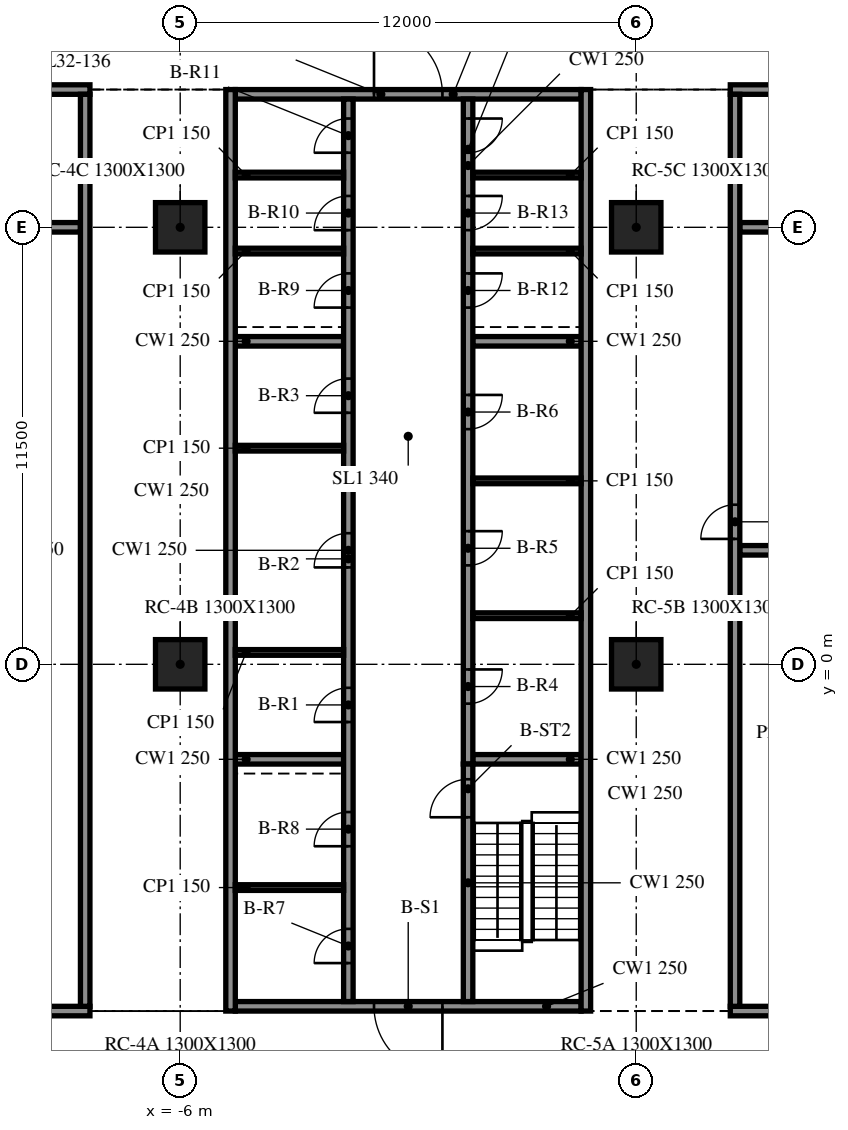
"""IFC4 building model, lengths in metres.
Left out: names, types, materials, properties, quantities, classifications, styles, units other than length and angle.
Written with IfcOpenShell. Run it as: python <this file> out.ifc"""

import sys

from ifc_helpers import new_model, si_unit, direction, frame, frame_2d, origin, origin_2d, place, context, subcontext, project, spatial, rectangle, extrude, element, fill, save


model = new_model("IFC4")
c1 = context("Model", 3, precision=1e-05, world=origin(), true_north=direction((0.0, 1.0)))
c2 = subcontext(c1, "Body", "Model", "MODEL_VIEW")
j1 = project(units=[si_unit("LENGTHUNIT", "METRE"), si_unit("PLANEANGLEUNIT", "RADIAN")], contexts=[c1])
p1 = place(None, origin())
s1 = spatial("IfcSite", under=j1, at=p1, CompositionType="ELEMENT")
p2 = place(p1, origin())
s2 = spatial("IfcBuilding", under=s1, at=p2, CompositionType="ELEMENT")
p3 = place(p2, frame((0.0, 0.0, 138.4)))
s3 = spatial("IfcBuildingStorey", under=s2, at=p3, CompositionType="ELEMENT", Elevation=138.4)
for number, where, z_axis, x_axis in (
    (1, (-6.0, 0.0, -0.34), (0.0, 0.0, 1.0), (1.0, 0.0, 0.0)),
    (2, (-6.0, 11.5, -0.34), (0.0, 0.0, 1.0), (1.0, 0.0, 0.0)),
    (3, (6.0, 0.0, -0.34), (0.0, 0.0, 1.0), (1.0, 0.0, 0.0)),
    (4, (6.0, 11.5, -0.34), (0.0, 0.0, 1.0), (1.0, 0.0, 0.0)),
):
    element("IfcColumn", number, at=place(p3, frame(where, z_axis=z_axis, x_axis=x_axis)), inside=s3, PredefinedType="COLUMN", context=c2, shape_type="SweptSolid", body=[
        extrude(rectangle(XDim=1.3, YDim=1.3, at=origin_2d()), origin(), (0.0, 0.0, 1.0), 4.1),
    ])
for number, where, z_axis, x_axis in (
    (5, (-4.675, 15.125, 0.0), (0.0, 0.0, 1.0), (0.0, -1.0, 0.0)),
    (6, (4.675, -9.125, 0.0), (0.0, 0.0, 1.0), (0.0, 1.0, 0.0)),
):
    element("IfcWall", number, at=place(p3, frame(where, z_axis=z_axis, x_axis=x_axis)), inside=s3, PredefinedType="SOLIDWALL", context=c2, shape_type="SweptSolid", body=[
        extrude(rectangle(XDim=24.25, YDim=0.25, at=frame_2d((12.125, 0.0))), origin(), (0.0, 0.0, 1.0), 3.76),
    ])
p4 = place(p3, frame((4.55, -9.0, 0.0), z_axis=(0.0, 0.0, 1.0), x_axis=(-1.0, 0.0, 0.0)))
e7 = element("IfcWall", 7, at=p4, inside=s3, PredefinedType="SOLIDWALL", context=c2, shape_type="SweptSolid", body=[
    extrude(rectangle(XDim=9.1, YDim=0.25, at=frame_2d((4.55, 0.0))), origin(), (0.0, 0.0, 1.0), 3.76),
])
p5 = place(p4, frame((3.65, 0.0, 0.0)))
e8 = element("IfcOpeningElement", 8, at=p5, cuts=e7, PredefinedType="OPENING", context=c2, shape_type="SweptSolid", body=[
    extrude(rectangle(XDim=1.8, YDim=2.1, at=frame_2d((0.9, 1.05))), frame((0.0, 0.135, 0.0), z_axis=(0.0, -1.0, 0.0), x_axis=(1.0, 0.0, 0.0)), (0.0, 0.0, 1.0), 0.27),
])
p6 = place(p3, frame((-4.55, 15.0, 0.0), z_axis=(0.0, 0.0, 1.0), x_axis=(1.0, 0.0, 0.0)))
e9 = element("IfcWall", 9, at=p6, inside=s3, PredefinedType="SOLIDWALL", context=c2, shape_type="SweptSolid", body=[
    extrude(rectangle(XDim=9.1, YDim=0.25, at=frame_2d((4.55, 0.0))), origin(), (0.0, 0.0, 1.0), 3.76),
])
p7 = place(p6, frame((3.65, 0.0, 0.0)))
e10 = element("IfcOpeningElement", 10, at=p7, cuts=e9, PredefinedType="OPENING", context=c2, shape_type="SweptSolid", body=[
    extrude(rectangle(XDim=1.8, YDim=2.1, at=frame_2d((0.9, 1.05))), frame((0.0, 0.135, 0.0), z_axis=(0.0, -1.0, 0.0), x_axis=(1.0, 0.0, 0.0)), (0.0, 0.0, 1.0), 0.27),
])
p8 = place(p3, frame((-1.575, -8.875, 0.0), z_axis=(0.0, 0.0, 1.0), x_axis=(0.0, 1.0, 0.0)))
e11 = element("IfcWall", 11, at=p8, inside=s3, PredefinedType="SOLIDWALL", context=c2, shape_type="SweptSolid", body=[
    extrude(rectangle(XDim=23.75, YDim=0.25, at=frame_2d((11.875, 0.0))), origin(), (0.0, 0.0, 1.0), 3.76),
])
p9 = place(p8, frame((7.356, 0.0, 0.0)))
e12 = element("IfcOpeningElement", 12, at=p9, cuts=e11, PredefinedType="OPENING", context=c2, shape_type="SweptSolid", body=[
    extrude(rectangle(XDim=0.9, YDim=2.1, at=frame_2d((0.45, 1.05))), frame((0.0, 0.135, 0.0), z_axis=(0.0, -1.0, 0.0), x_axis=(1.0, 0.0, 0.0)), (0.0, 0.0, 1.0), 0.27),
])
p10 = place(p8, frame((11.425, 0.0, 0.0)))
e13 = element("IfcOpeningElement", 13, at=p10, cuts=e11, PredefinedType="OPENING", context=c2, shape_type="SweptSolid", body=[
    extrude(rectangle(XDim=0.9, YDim=2.1, at=frame_2d((0.45, 1.05))), frame((0.0, 0.135, 0.0), z_axis=(0.0, -1.0, 0.0), x_axis=(1.0, 0.0, 0.0)), (0.0, 0.0, 1.0), 0.27),
])
p11 = place(p8, frame((15.494, 0.0, 0.0)))
e14 = element("IfcOpeningElement", 14, at=p11, cuts=e11, PredefinedType="OPENING", context=c2, shape_type="SweptSolid", body=[
    extrude(rectangle(XDim=0.9, YDim=2.1, at=frame_2d((0.45, 1.05))), frame((0.0, 0.135, 0.0), z_axis=(0.0, -1.0, 0.0), x_axis=(1.0, 0.0, 0.0)), (0.0, 0.0, 1.0), 0.27),
])
p12 = place(p8, frame((1.012, 0.0, 0.0)))
e15 = element("IfcOpeningElement", 15, at=p12, cuts=e11, PredefinedType="OPENING", context=c2, shape_type="SweptSolid", body=[
    extrude(rectangle(XDim=0.9, YDim=2.1, at=frame_2d((0.45, 1.05))), frame((0.0, 0.135, 0.0), z_axis=(0.0, -1.0, 0.0), x_axis=(1.0, 0.0, 0.0)), (0.0, 0.0, 1.0), 0.27),
])
p13 = place(p8, frame((4.087, 0.0, 0.0)))
e16 = element("IfcOpeningElement", 16, at=p13, cuts=e11, PredefinedType="OPENING", context=c2, shape_type="SweptSolid", body=[
    extrude(rectangle(XDim=0.9, YDim=2.1, at=frame_2d((0.45, 1.05))), frame((0.0, 0.135, 0.0), z_axis=(0.0, -1.0, 0.0), x_axis=(1.0, 0.0, 0.0)), (0.0, 0.0, 1.0), 0.27),
])
p14 = place(p8, frame((18.262, 0.0, 0.0)))
e17 = element("IfcOpeningElement", 17, at=p14, cuts=e11, PredefinedType="OPENING", context=c2, shape_type="SweptSolid", body=[
    extrude(rectangle(XDim=0.9, YDim=2.1, at=frame_2d((0.45, 1.05))), frame((0.0, 0.135, 0.0), z_axis=(0.0, -1.0, 0.0), x_axis=(1.0, 0.0, 0.0)), (0.0, 0.0, 1.0), 0.27),
])
p15 = place(p8, frame((20.3, 0.0, 0.0)))
e18 = element("IfcOpeningElement", 18, at=p15, cuts=e11, PredefinedType="OPENING", context=c2, shape_type="SweptSolid", body=[
    extrude(rectangle(XDim=0.9, YDim=2.1, at=frame_2d((0.45, 1.05))), frame((0.0, 0.135, 0.0), z_axis=(0.0, -1.0, 0.0), x_axis=(1.0, 0.0, 0.0)), (0.0, 0.0, 1.0), 0.27),
])
p16 = place(p8, frame((22.337, 0.0, 0.0)))
e19 = element("IfcOpeningElement", 19, at=p16, cuts=e11, PredefinedType="OPENING", context=c2, shape_type="SweptSolid", body=[
    extrude(rectangle(XDim=0.9, YDim=2.1, at=frame_2d((0.45, 1.05))), frame((0.0, 0.135, 0.0), z_axis=(0.0, -1.0, 0.0), x_axis=(1.0, 0.0, 0.0)), (0.0, 0.0, 1.0), 0.27),
])
p17 = place(p3, frame((1.575, -8.875, 0.0), z_axis=(0.0, 0.0, 1.0), x_axis=(0.0, 1.0, 0.0)))
e20 = element("IfcWall", 20, at=p17, inside=s3, PredefinedType="SOLIDWALL", context=c2, shape_type="SweptSolid", body=[
    extrude(rectangle(XDim=6.25, YDim=0.25, at=frame_2d((3.125, 0.0))), origin(), (0.0, 0.0, 1.0), 3.76),
])
p18 = place(p17, frame((4.85, 0.0, 0.0)))
e21 = element("IfcOpeningElement", 21, at=p18, cuts=e20, PredefinedType="OPENING", context=c2, shape_type="SweptSolid", body=[
    extrude(rectangle(XDim=1.0, YDim=2.1, at=frame_2d((0.5, 1.05))), frame((0.0, 0.135, 0.0), z_axis=(0.0, -1.0, 0.0), x_axis=(1.0, 0.0, 0.0)), (0.0, 0.0, 1.0), 0.27),
])
p19 = place(p3, frame((1.575, 14.875, 0.0), z_axis=(0.0, 0.0, 1.0), x_axis=(0.0, -1.0, 0.0)))
e22 = element("IfcWall", 22, at=p19, inside=s3, PredefinedType="SOLIDWALL", context=c2, shape_type="SweptSolid", body=[
    extrude(rectangle(XDim=17.5, YDim=0.25, at=frame_2d((8.75, 0.0))), origin(), (0.0, 0.0, 1.0), 3.76),
])
p20 = place(p19, frame((15.01, 0.0, 0.0)))
e23 = element("IfcOpeningElement", 23, at=p20, cuts=e22, PredefinedType="OPENING", context=c2, shape_type="SweptSolid", body=[
    extrude(rectangle(XDim=0.9, YDim=2.1, at=frame_2d((0.45, 1.05))), frame((0.0, 0.135, 0.0), z_axis=(0.0, -1.0, 0.0), x_axis=(1.0, 0.0, 0.0)), (0.0, 0.0, 1.0), 0.27),
])
p21 = place(p19, frame((11.371, 0.0, 0.0)))
e24 = element("IfcOpeningElement", 24, at=p21, cuts=e22, PredefinedType="OPENING", context=c2, shape_type="SweptSolid", body=[
    extrude(rectangle(XDim=0.9, YDim=2.1, at=frame_2d((0.45, 1.05))), frame((0.0, 0.135, 0.0), z_axis=(0.0, -1.0, 0.0), x_axis=(1.0, 0.0, 0.0)), (0.0, 0.0, 1.0), 0.27),
])
p22 = place(p19, frame((7.786, 0.0, 0.0)))
e25 = element("IfcOpeningElement", 25, at=p22, cuts=e22, PredefinedType="OPENING", context=c2, shape_type="SweptSolid", body=[
    extrude(rectangle(XDim=0.9, YDim=2.1, at=frame_2d((0.45, 1.05))), frame((0.0, 0.135, 0.0), z_axis=(0.0, -1.0, 0.0), x_axis=(1.0, 0.0, 0.0)), (0.0, 0.0, 1.0), 0.27),
])
p23 = place(p19, frame((4.587, 0.0, 0.0)))
e26 = element("IfcOpeningElement", 26, at=p23, cuts=e22, PredefinedType="OPENING", context=c2, shape_type="SweptSolid", body=[
    extrude(rectangle(XDim=0.9, YDim=2.1, at=frame_2d((0.45, 1.05))), frame((0.0, 0.135, 0.0), z_axis=(0.0, -1.0, 0.0), x_axis=(1.0, 0.0, 0.0)), (0.0, 0.0, 1.0), 0.27),
])
p24 = place(p19, frame((2.55, 0.0, 0.0)))
e27 = element("IfcOpeningElement", 27, at=p24, cuts=e22, PredefinedType="OPENING", context=c2, shape_type="SweptSolid", body=[
    extrude(rectangle(XDim=0.9, YDim=2.1, at=frame_2d((0.45, 1.05))), frame((0.0, 0.135, 0.0), z_axis=(0.0, -1.0, 0.0), x_axis=(1.0, 0.0, 0.0)), (0.0, 0.0, 1.0), 0.27),
])
p25 = place(p19, frame((0.512, 0.0, 0.0)))
e28 = element("IfcOpeningElement", 28, at=p25, cuts=e22, PredefinedType="OPENING", context=c2, shape_type="SweptSolid", body=[
    extrude(rectangle(XDim=0.9, YDim=2.1, at=frame_2d((0.45, 1.05))), frame((0.0, 0.135, 0.0), z_axis=(0.0, -1.0, 0.0), x_axis=(1.0, 0.0, 0.0)), (0.0, 0.0, 1.0), 0.27),
])
for number, where, z_axis, x_axis in (
    (29, (-4.55, -2.5, 0.0), (0.0, 0.0, 1.0), (1.0, 0.0, 0.0)),
    (30, (-4.55, 8.5, 0.0), (0.0, 0.0, 1.0), (1.0, 0.0, 0.0)),
    (31, (1.7, -2.5, 0.0), (0.0, 0.0, 1.0), (1.0, 0.0, 0.0)),
    (32, (1.7, 8.5, 0.0), (0.0, 0.0, 1.0), (1.0, 0.0, 0.0)),
):
    element("IfcWall", number, at=place(p3, frame(where, z_axis=z_axis, x_axis=x_axis)), inside=s3, PredefinedType="SOLIDWALL", context=c2, shape_type="SweptSolid", body=[
        extrude(rectangle(XDim=2.85, YDim=0.25, at=frame_2d((1.425, 0.0))), origin(), (0.0, 0.0, 1.0), 3.76),
    ])
for number, where, z_axis, x_axis in (
    (33, (-4.55, 0.312, 0.0), (0.0, 0.0, 1.0), (1.0, 0.0, 0.0)),
    (34, (-4.55, 5.688, 0.0), (0.0, 0.0, 1.0), (1.0, 0.0, 0.0)),
    (35, (1.7, 1.28, 0.0), (0.0, 0.0, 1.0), (1.0, 0.0, 0.0)),
    (36, (1.7, 4.827, 0.0), (0.0, 0.0, 1.0), (1.0, 0.0, 0.0)),
    (37, (-4.55, -5.875, 0.0), (0.0, 0.0, 1.0), (1.0, 0.0, 0.0)),
    (38, (-4.55, 10.875, 0.0), (0.0, 0.0, 1.0), (1.0, 0.0, 0.0)),
    (39, (-4.55, 12.875, 0.0), (0.0, 0.0, 1.0), (1.0, 0.0, 0.0)),
    (40, (1.7, 10.875, 0.0), (0.0, 0.0, 1.0), (1.0, 0.0, 0.0)),
    (41, (1.7, 12.875, 0.0), (0.0, 0.0, 1.0), (1.0, 0.0, 0.0)),
):
    element("IfcWall", number, at=place(p3, frame(where, z_axis=z_axis, x_axis=x_axis)), inside=s3, PredefinedType="PARTITIONING", context=c2, shape_type="SweptSolid", body=[
        extrude(rectangle(XDim=2.85, YDim=0.15, at=frame_2d((1.425, 0.0))), origin(), (0.0, 0.0, 1.0), 3.76),
    ])
p26 = place(p3, frame((-15.725, -9.125, 0.0), z_axis=(0.0, 0.0, 1.0), x_axis=(1.0, 0.0, 0.0)))
e42 = element("IfcWall", 42, at=p26, inside=s3, PredefinedType="PARTITIONING", context=c2, shape_type="SweptSolid", body=[
    extrude(rectangle(XDim=7.35, YDim=0.25, at=frame_2d((3.675, 0.0))), origin(), (0.0, 0.0, 1.0), 3.76),
])
p27 = place(p3, frame((8.475, -9.125, 0.0), z_axis=(0.0, 0.0, 1.0), x_axis=(1.0, 0.0, 0.0)))
e43 = element("IfcWall", 43, at=p27, inside=s3, PredefinedType="PARTITIONING", context=c2, shape_type="SweptSolid", body=[
    extrude(rectangle(XDim=6.95, YDim=0.25, at=frame_2d((3.475, 0.0))), origin(), (0.0, 0.0, 1.0), 3.76),
])
p28 = place(p27, frame((3.1, 0.0, 0.0)))
e44 = element("IfcOpeningElement", 44, at=p28, cuts=e43, PredefinedType="OPENING", context=c2, shape_type="SweptSolid", body=[
    extrude(rectangle(XDim=0.9, YDim=2.1, at=frame_2d((0.45, 1.05))), frame((0.0, 0.135, 0.0), z_axis=(0.0, -1.0, 0.0), x_axis=(1.0, 0.0, 0.0)), (0.0, 0.0, 1.0), 0.27),
])
p29 = place(p3, frame((8.725, 3.0, 0.0), z_axis=(0.0, 0.0, 1.0), x_axis=(1.0, 0.0, 0.0)))
e45 = element("IfcWall", 45, at=p29, inside=s3, PredefinedType="PARTITIONING", context=c2, shape_type="SweptSolid", body=[
    extrude(rectangle(XDim=6.45, YDim=0.25, at=frame_2d((3.225, 0.0))), origin(), (0.0, 0.0, 1.0), 3.76),
])
p30 = place(p3, frame((-15.475, 11.5, 0.0), z_axis=(0.0, 0.0, 1.0), x_axis=(1.0, 0.0, 0.0)))
e46 = element("IfcWall", 46, at=p30, inside=s3, PredefinedType="PARTITIONING", context=c2, shape_type="SweptSolid", body=[
    extrude(rectangle(XDim=6.85, YDim=0.25, at=frame_2d((3.425, 0.0))), origin(), (0.0, 0.0, 1.0), 3.76),
])
p31 = place(p3, frame((8.725, 11.5, 0.0), z_axis=(0.0, 0.0, 1.0), x_axis=(1.0, 0.0, 0.0)))
e47 = element("IfcWall", 47, at=p31, inside=s3, PredefinedType="PARTITIONING", context=c2, shape_type="SweptSolid", body=[
    extrude(rectangle(XDim=6.45, YDim=0.25, at=frame_2d((3.225, 0.0))), origin(), (0.0, 0.0, 1.0), 3.76),
])
p32 = place(p3, frame((-15.725, 15.125, 0.0), z_axis=(0.0, 0.0, 1.0), x_axis=(1.0, 0.0, 0.0)))
e48 = element("IfcWall", 48, at=p32, inside=s3, PredefinedType="PARTITIONING", context=c2, shape_type="SweptSolid", body=[
    extrude(rectangle(XDim=7.35, YDim=0.25, at=frame_2d((3.675, 0.0))), origin(), (0.0, 0.0, 1.0), 3.76),
])
p33 = place(p32, frame((3.3, 0.0, 0.0)))
e49 = element("IfcOpeningElement", 49, at=p33, cuts=e48, PredefinedType="OPENING", context=c2, shape_type="SweptSolid", body=[
    extrude(rectangle(XDim=0.9, YDim=2.1, at=frame_2d((0.45, 1.05))), frame((0.0, 0.135, 0.0), z_axis=(0.0, -1.0, 0.0), x_axis=(1.0, 0.0, 0.0)), (0.0, 0.0, 1.0), 0.27),
])
p34 = place(p3, frame((8.475, 15.125, 0.0), z_axis=(0.0, 0.0, 1.0), x_axis=(1.0, 0.0, 0.0)))
e50 = element("IfcWall", 50, at=p34, inside=s3, PredefinedType="PARTITIONING", context=c2, shape_type="SweptSolid", body=[
    extrude(rectangle(XDim=6.95, YDim=0.25, at=frame_2d((3.475, 0.0))), origin(), (0.0, 0.0, 1.0), 3.76),
])
p35 = place(p34, frame((3.1, 0.0, 0.0)))
e51 = element("IfcOpeningElement", 51, at=p35, cuts=e50, PredefinedType="OPENING", context=c2, shape_type="SweptSolid", body=[
    extrude(rectangle(XDim=0.9, YDim=2.1, at=frame_2d((0.45, 1.05))), frame((0.0, 0.135, 0.0), z_axis=(0.0, -1.0, 0.0), x_axis=(1.0, 0.0, 0.0)), (0.0, 0.0, 1.0), 0.27),
])
p36 = place(p3, frame((-8.5, -9.0, 0.0), z_axis=(0.0, 0.0, 1.0), x_axis=(0.0, 1.0, 0.0)))
e52 = element("IfcWall", 52, at=p36, inside=s3, PredefinedType="PARTITIONING", context=c2, shape_type="SweptSolid", body=[
    extrude(rectangle(XDim=24.0, YDim=0.25, at=frame_2d((12.0, 0.0))), origin(), (0.0, 0.0, 1.0), 3.76),
])
p37 = place(p3, frame((8.6, -9.0, 0.0), z_axis=(0.0, 0.0, 1.0), x_axis=(0.0, 1.0, 0.0)))
e53 = element("IfcWall", 53, at=p37, inside=s3, PredefinedType="PARTITIONING", context=c2, shape_type="SweptSolid", body=[
    extrude(rectangle(XDim=24.0, YDim=0.25, at=frame_2d((12.0, 0.0))), origin(), (0.0, 0.0, 1.0), 3.76),
])
p38 = place(p37, frame((12.3, 0.0, 0.0)))
e54 = element("IfcOpeningElement", 54, at=p38, cuts=e53, PredefinedType="OPENING", context=c2, shape_type="SweptSolid", body=[
    extrude(rectangle(XDim=0.9, YDim=2.1, at=frame_2d((0.45, 1.05))), frame((0.0, 0.135, 0.0), z_axis=(0.0, -1.0, 0.0), x_axis=(1.0, 0.0, 0.0)), (0.0, 0.0, 1.0), 0.27),
])
p39 = place(p5, origin())
e55 = element("IfcDoor", 55, at=p39, inside=s3, OperationType="DOUBLE_DOOR_SINGLE_SWING", PredefinedType="DOOR", context=c2, shape_type="SweptSolid", body=[
    extrude(rectangle(XDim=1.8, YDim=2.1, at=frame_2d((0.9, 1.05))), frame((0.0, 0.025, 0.0), z_axis=(0.0, -1.0, 0.0), x_axis=(1.0, 0.0, 0.0)), (0.0, 0.0, 1.0), 0.05),
])
fill(e8, e55)
p40 = place(p7, origin())
e56 = element("IfcDoor", 56, at=p40, inside=s3, OperationType="DOUBLE_DOOR_SINGLE_SWING", PredefinedType="DOOR", context=c2, shape_type="SweptSolid", body=[
    extrude(rectangle(XDim=1.8, YDim=2.1, at=frame_2d((0.9, 1.05))), frame((0.0, 0.025, 0.0), z_axis=(0.0, -1.0, 0.0), x_axis=(1.0, 0.0, 0.0)), (0.0, 0.0, 1.0), 0.05),
])
fill(e10, e56)
p41 = place(p9, origin())
e57 = element("IfcDoor", 57, at=p41, inside=s3, OperationType="SINGLE_SWING_LEFT", PredefinedType="DOOR", context=c2, shape_type="SweptSolid", body=[
    extrude(rectangle(XDim=0.9, YDim=2.1, at=frame_2d((0.45, 1.05))), frame((0.0, 0.025, 0.0), z_axis=(0.0, -1.0, 0.0), x_axis=(1.0, 0.0, 0.0)), (0.0, 0.0, 1.0), 0.05),
])
fill(e12, e57)
p42 = place(p10, origin())
e58 = element("IfcDoor", 58, at=p42, inside=s3, OperationType="SINGLE_SWING_RIGHT", PredefinedType="DOOR", context=c2, shape_type="SweptSolid", body=[
    extrude(rectangle(XDim=0.9, YDim=2.1, at=frame_2d((0.45, 1.05))), frame((0.0, 0.025, 0.0), z_axis=(0.0, -1.0, 0.0), x_axis=(1.0, 0.0, 0.0)), (0.0, 0.0, 1.0), 0.05),
])
fill(e13, e58)
p43 = place(p11, origin())
e59 = element("IfcDoor", 59, at=p43, inside=s3, OperationType="SINGLE_SWING_LEFT", PredefinedType="DOOR", context=c2, shape_type="SweptSolid", body=[
    extrude(rectangle(XDim=0.9, YDim=2.1, at=frame_2d((0.45, 1.05))), frame((0.0, 0.025, 0.0), z_axis=(0.0, -1.0, 0.0), x_axis=(1.0, 0.0, 0.0)), (0.0, 0.0, 1.0), 0.05),
])
fill(e14, e59)
p44 = place(p20, origin())
e60 = element("IfcDoor", 60, at=p44, inside=s3, OperationType="SINGLE_SWING_RIGHT", PredefinedType="DOOR", context=c2, shape_type="SweptSolid", body=[
    extrude(rectangle(XDim=0.9, YDim=2.1, at=frame_2d((0.45, 1.05))), frame((0.0, 0.025, 0.0), z_axis=(0.0, -1.0, 0.0), x_axis=(1.0, 0.0, 0.0)), (0.0, 0.0, 1.0), 0.05),
])
fill(e23, e60)
p45 = place(p21, origin())
e61 = element("IfcDoor", 61, at=p45, inside=s3, OperationType="SINGLE_SWING_LEFT", PredefinedType="DOOR", context=c2, shape_type="SweptSolid", body=[
    extrude(rectangle(XDim=0.9, YDim=2.1, at=frame_2d((0.45, 1.05))), frame((0.0, 0.025, 0.0), z_axis=(0.0, -1.0, 0.0), x_axis=(1.0, 0.0, 0.0)), (0.0, 0.0, 1.0), 0.05),
])
fill(e24, e61)
p46 = place(p22, origin())
e62 = element("IfcDoor", 62, at=p46, inside=s3, OperationType="SINGLE_SWING_RIGHT", PredefinedType="DOOR", context=c2, shape_type="SweptSolid", body=[
    extrude(rectangle(XDim=0.9, YDim=2.1, at=frame_2d((0.45, 1.05))), frame((0.0, 0.025, 0.0), z_axis=(0.0, -1.0, 0.0), x_axis=(1.0, 0.0, 0.0)), (0.0, 0.0, 1.0), 0.05),
])
fill(e25, e62)
p47 = place(p12, origin())
e63 = element("IfcDoor", 63, at=p47, inside=s3, OperationType="SINGLE_SWING_LEFT", PredefinedType="DOOR", context=c2, shape_type="SweptSolid", body=[
    extrude(rectangle(XDim=0.9, YDim=2.1, at=frame_2d((0.45, 1.05))), frame((0.0, 0.025, 0.0), z_axis=(0.0, -1.0, 0.0), x_axis=(1.0, 0.0, 0.0)), (0.0, 0.0, 1.0), 0.05),
])
fill(e15, e63)
p48 = place(p13, origin())
e64 = element("IfcDoor", 64, at=p48, inside=s3, OperationType="SINGLE_SWING_RIGHT", PredefinedType="DOOR", context=c2, shape_type="SweptSolid", body=[
    extrude(rectangle(XDim=0.9, YDim=2.1, at=frame_2d((0.45, 1.05))), frame((0.0, 0.025, 0.0), z_axis=(0.0, -1.0, 0.0), x_axis=(1.0, 0.0, 0.0)), (0.0, 0.0, 1.0), 0.05),
])
fill(e16, e64)
p49 = place(p14, origin())
e65 = element("IfcDoor", 65, at=p49, inside=s3, OperationType="SINGLE_SWING_LEFT", PredefinedType="DOOR", context=c2, shape_type="SweptSolid", body=[
    extrude(rectangle(XDim=0.9, YDim=2.1, at=frame_2d((0.45, 1.05))), frame((0.0, 0.025, 0.0), z_axis=(0.0, -1.0, 0.0), x_axis=(1.0, 0.0, 0.0)), (0.0, 0.0, 1.0), 0.05),
])
fill(e17, e65)
p50 = place(p15, origin())
e66 = element("IfcDoor", 66, at=p50, inside=s3, OperationType="SINGLE_SWING_RIGHT", PredefinedType="DOOR", context=c2, shape_type="SweptSolid", body=[
    extrude(rectangle(XDim=0.9, YDim=2.1, at=frame_2d((0.45, 1.05))), frame((0.0, 0.025, 0.0), z_axis=(0.0, -1.0, 0.0), x_axis=(1.0, 0.0, 0.0)), (0.0, 0.0, 1.0), 0.05),
])
fill(e18, e66)
p51 = place(p16, origin())
e67 = element("IfcDoor", 67, at=p51, inside=s3, OperationType="SINGLE_SWING_LEFT", PredefinedType="DOOR", context=c2, shape_type="SweptSolid", body=[
    extrude(rectangle(XDim=0.9, YDim=2.1, at=frame_2d((0.45, 1.05))), frame((0.0, 0.025, 0.0), z_axis=(0.0, -1.0, 0.0), x_axis=(1.0, 0.0, 0.0)), (0.0, 0.0, 1.0), 0.05),
])
fill(e19, e67)
p52 = place(p23, origin())
e68 = element("IfcDoor", 68, at=p52, inside=s3, OperationType="SINGLE_SWING_RIGHT", PredefinedType="DOOR", context=c2, shape_type="SweptSolid", body=[
    extrude(rectangle(XDim=0.9, YDim=2.1, at=frame_2d((0.45, 1.05))), frame((0.0, 0.025, 0.0), z_axis=(0.0, -1.0, 0.0), x_axis=(1.0, 0.0, 0.0)), (0.0, 0.0, 1.0), 0.05),
])
fill(e26, e68)
p53 = place(p24, origin())
e69 = element("IfcDoor", 69, at=p53, inside=s3, OperationType="SINGLE_SWING_LEFT", PredefinedType="DOOR", context=c2, shape_type="SweptSolid", body=[
    extrude(rectangle(XDim=0.9, YDim=2.1, at=frame_2d((0.45, 1.05))), frame((0.0, 0.025, 0.0), z_axis=(0.0, -1.0, 0.0), x_axis=(1.0, 0.0, 0.0)), (0.0, 0.0, 1.0), 0.05),
])
fill(e27, e69)
p54 = place(p25, origin())
e70 = element("IfcDoor", 70, at=p54, inside=s3, OperationType="SINGLE_SWING_RIGHT", PredefinedType="DOOR", context=c2, shape_type="SweptSolid", body=[
    extrude(rectangle(XDim=0.9, YDim=2.1, at=frame_2d((0.45, 1.05))), frame((0.0, 0.025, 0.0), z_axis=(0.0, -1.0, 0.0), x_axis=(1.0, 0.0, 0.0)), (0.0, 0.0, 1.0), 0.05),
])
fill(e28, e70)
p55 = place(p18, origin())
e71 = element("IfcDoor", 71, at=p55, inside=s3, OperationType="SINGLE_SWING_LEFT", PredefinedType="DOOR", context=c2, shape_type="SweptSolid", body=[
    extrude(rectangle(XDim=1.0, YDim=2.1, at=frame_2d((0.5, 1.05))), frame((0.0, 0.025, 0.0), z_axis=(0.0, -1.0, 0.0), x_axis=(1.0, 0.0, 0.0)), (0.0, 0.0, 1.0), 0.05),
])
fill(e21, e71)
p56 = place(p38, origin())
e72 = element("IfcDoor", 72, at=p56, inside=s3, OperationType="SINGLE_SWING_LEFT", PredefinedType="DOOR", context=c2, shape_type="SweptSolid", body=[
    extrude(rectangle(XDim=0.9, YDim=2.1, at=frame_2d((0.45, 1.05))), frame((0.0, 0.025, 0.0), z_axis=(0.0, -1.0, 0.0), x_axis=(1.0, 0.0, 0.0)), (0.0, 0.0, 1.0), 0.05),
])
fill(e54, e72)
save(model, sys.argv[1])
